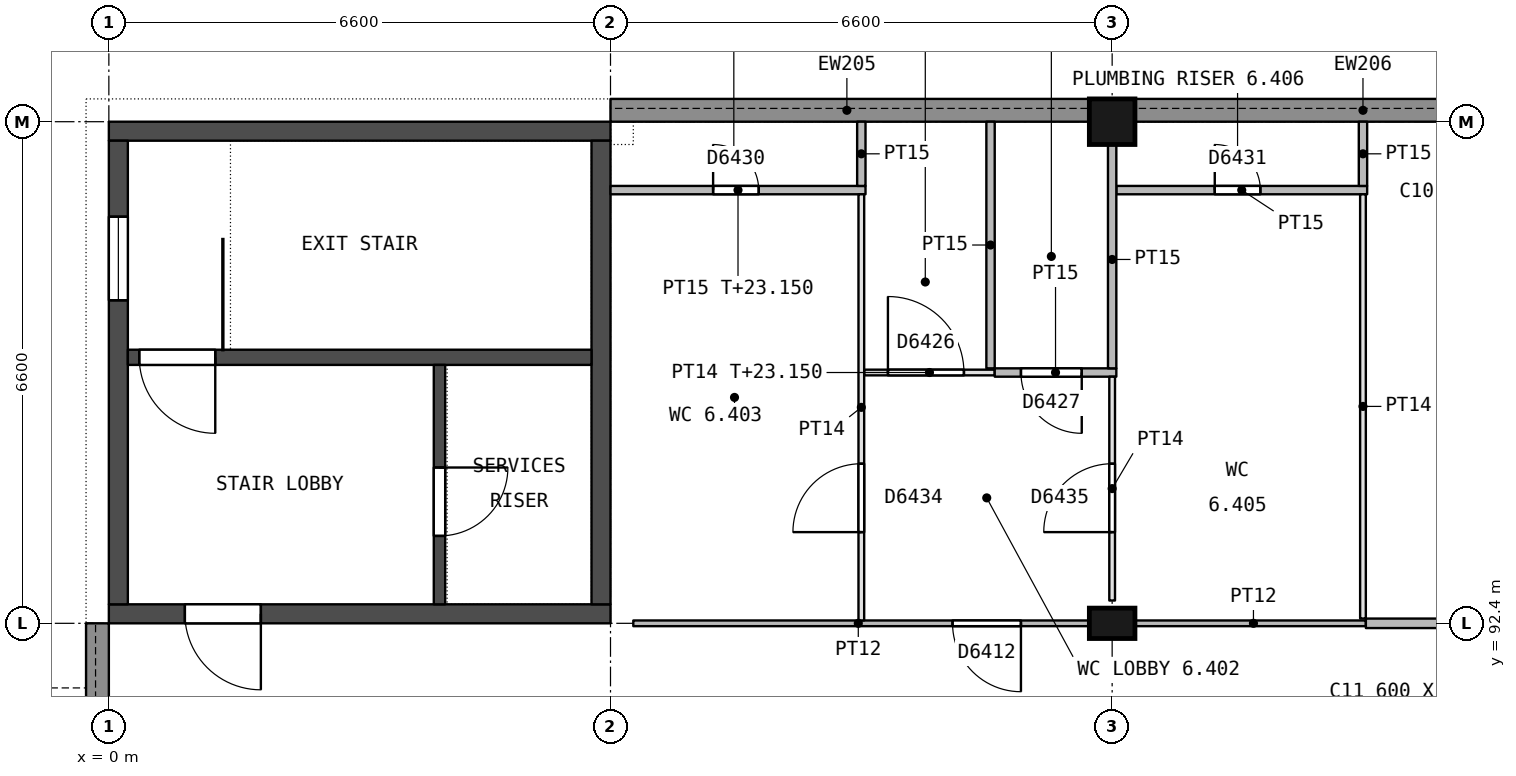
"""IFC4 building model, lengths in metres.
Left out: names, types, materials, properties, quantities, classifications, styles, units other than length and angle.
Written with IfcOpenShell. Run it as: python <this file> out.ifc"""

import sys

from ifc_helpers import new_model, si_unit, direction, frame, frame_2d, origin, origin_2d, place, context, subcontext, project, spatial, rectangle, extrude, element, fill, save


model = new_model("IFC4")
c1 = context("Model", 3, precision=1e-05, world=origin(), true_north=direction((0.0, 1.0)))
c2 = subcontext(c1, "Body", "Model", "MODEL_VIEW")
j1 = project(units=[si_unit("LENGTHUNIT", "METRE"), si_unit("PLANEANGLEUNIT", "RADIAN")], contexts=[c1])
p1 = place(None, origin())
s1 = spatial("IfcSite", under=j1, at=p1, CompositionType="ELEMENT")
p2 = place(p1, origin())
s2 = spatial("IfcBuilding", under=s1, at=p2, CompositionType="ELEMENT")
p3 = place(p2, frame((0.0, 0.0, 18.9)))
s3 = spatial("IfcBuildingStorey", under=s2, at=p3, CompositionType="ELEMENT", Elevation=18.9)
p4 = place(p3, frame((13.2, 92.4, 0.0), z_axis=(0.0, 0.0, 1.0), x_axis=(1.0, 0.0, 0.0)))
e1 = element("IfcColumn", 1, at=p4, inside=s3, PredefinedType="COLUMN", context=c2, shape_type="SweptSolid", body=[
    extrude(rectangle(XDim=0.6, YDim=0.4, at=origin_2d()), origin(), (0.0, 0.0, 1.0), 4.25),
])
p5 = place(p3, frame((13.2, 99.0, 0.0), z_axis=(0.0, 0.0, 1.0), x_axis=(1.0, 0.0, 0.0)))
e2 = element("IfcColumn", 2, at=p5, inside=s3, PredefinedType="COLUMN", context=c2, shape_type="SweptSolid", body=[
    extrude(rectangle(XDim=0.6, YDim=0.6, at=origin_2d()), origin(), (0.0, 0.0, 1.0), 4.25),
])
p6 = place(p3, frame((0.0, 92.525, 0.0), z_axis=(0.0, 0.0, 1.0), x_axis=(1.0, 0.0, 0.0)))
e3 = element("IfcWall", 3, at=p6, inside=s3, PredefinedType="SHEAR", context=c2, shape_type="SweptSolid", body=[
    extrude(rectangle(XDim=6.6, YDim=0.25, at=frame_2d((3.3, 0.0))), origin(), (0.0, 0.0, 1.0), 4.25),
])
p7 = place(p6, frame((1.0, 0.0, 0.0)))
e4 = element("IfcOpeningElement", 4, at=p7, cuts=e3, PredefinedType="OPENING", context=c2, shape_type="SweptSolid", body=[
    extrude(rectangle(XDim=1.0, YDim=2.1, at=frame_2d((0.5, 1.05))), frame((0.0, 0.135, 0.0), z_axis=(0.0, -1.0, 0.0), x_axis=(1.0, 0.0, 0.0)), (0.0, 0.0, 1.0), 0.27),
])
p8 = place(p3, frame((0.0, 98.875, 0.0), z_axis=(0.0, 0.0, 1.0), x_axis=(1.0, 0.0, 0.0)))
e5 = element("IfcWall", 5, at=p8, inside=s3, PredefinedType="SHEAR", context=c2, shape_type="SweptSolid", body=[
    extrude(rectangle(XDim=6.6, YDim=0.25, at=frame_2d((3.3, 0.0))), origin(), (0.0, 0.0, 1.0), 4.25),
])
p9 = place(p3, frame((0.125, 92.65, 0.0), z_axis=(0.0, 0.0, 1.0), x_axis=(0.0, 1.0, 0.0)))
e6 = element("IfcWall", 6, at=p9, inside=s3, PredefinedType="SHEAR", context=c2, shape_type="SweptSolid", body=[
    extrude(rectangle(XDim=6.1, YDim=0.25, at=frame_2d((3.05, 0.0))), origin(), (0.0, 0.0, 1.0), 4.25),
])
p10 = place(p9, frame((4.0, 0.0, 0.7)))
e7 = element("IfcOpeningElement", 7, at=p10, cuts=e6, PredefinedType="OPENING", context=c2, shape_type="SweptSolid", body=[
    extrude(rectangle(XDim=1.1, YDim=1.5, at=frame_2d((0.55, 0.75))), frame((0.0, 0.135, 0.0), z_axis=(0.0, -1.0, 0.0), x_axis=(1.0, 0.0, 0.0)), (0.0, 0.0, 1.0), 0.27),
])
p11 = place(p3, frame((6.475, 92.65, 0.0), z_axis=(0.0, 0.0, 1.0), x_axis=(0.0, 1.0, 0.0)))
e8 = element("IfcWall", 8, at=p11, inside=s3, PredefinedType="SHEAR", context=c2, shape_type="SweptSolid", body=[
    extrude(rectangle(XDim=6.1, YDim=0.25, at=frame_2d((3.05, 0.0))), origin(), (0.0, 0.0, 1.0), 4.25),
])
p12 = place(p3, frame((0.25, 95.9, 0.0), z_axis=(0.0, 0.0, 1.0), x_axis=(1.0, 0.0, 0.0)))
e9 = element("IfcWall", 9, at=p12, inside=s3, PredefinedType="SHEAR", context=c2, shape_type="SweptSolid", body=[
    extrude(rectangle(XDim=6.1, YDim=0.2, at=frame_2d((3.05, 0.0))), origin(), (0.0, 0.0, 1.0), 4.25),
])
p13 = place(p12, frame((0.15, 0.0, 0.0)))
e10 = element("IfcOpeningElement", 10, at=p13, cuts=e9, PredefinedType="OPENING", context=c2, shape_type="SweptSolid", body=[
    extrude(rectangle(XDim=1.0, YDim=2.1, at=frame_2d((0.5, 1.05))), frame((0.0, 0.11, 0.0), z_axis=(0.0, -1.0, 0.0), x_axis=(1.0, 0.0, 0.0)), (0.0, 0.0, 1.0), 0.22),
])
p14 = place(p3, frame((4.35, 92.65, 0.0), z_axis=(0.0, 0.0, 1.0), x_axis=(0.0, 1.0, 0.0)))
e11 = element("IfcWall", 11, at=p14, inside=s3, PredefinedType="SHEAR", context=c2, shape_type="SweptSolid", body=[
    extrude(rectangle(XDim=3.15, YDim=0.15, at=frame_2d((1.575, 0.0))), origin(), (0.0, 0.0, 1.0), 4.25),
])
p15 = place(p14, frame((0.9, 0.0, 0.0)))
e12 = element("IfcOpeningElement", 12, at=p15, cuts=e11, PredefinedType="OPENING", context=c2, shape_type="SweptSolid", body=[
    extrude(rectangle(XDim=0.9, YDim=2.1, at=frame_2d((0.45, 1.05))), frame((0.0, 0.085, 0.0), z_axis=(0.0, -1.0, 0.0), x_axis=(1.0, 0.0, 0.0)), (0.0, 0.0, 1.0), 0.17),
])
p16 = place(p3, frame((6.6, 99.15, 0.0), z_axis=(0.0, 0.0, 1.0), x_axis=(1.0, 0.0, 0.0)))
e13 = element("IfcWall", 13, at=p16, inside=s3, PredefinedType="STANDARD", context=c2, shape_type="SweptSolid", body=[
    extrude(rectangle(XDim=6.3, YDim=0.3, at=frame_2d((3.15, 0.0))), origin(), (0.0, 0.0, 1.0), 3.65),
])
p17 = place(p3, frame((13.5, 99.15, 0.0), z_axis=(0.0, 0.0, 1.0), x_axis=(1.0, 0.0, 0.0)))
e14 = element("IfcWall", 14, at=p17, inside=s3, PredefinedType="STANDARD", context=c2, shape_type="SweptSolid", body=[
    extrude(rectangle(XDim=6.0, YDim=0.3, at=frame_2d((3.0, 0.0))), origin(), (0.0, 0.0, 1.0), 3.65),
])
p18 = place(p3, frame((-0.15, 89.3, 0.0), z_axis=(0.0, 0.0, 1.0), x_axis=(0.0, 1.0, 0.0)))
e15 = element("IfcWall", 15, at=p18, inside=s3, PredefinedType="STANDARD", context=c2, shape_type="SweptSolid", body=[
    extrude(rectangle(XDim=3.1, YDim=0.3, at=frame_2d((1.55, 0.0))), origin(), (0.0, 0.0, 1.0), 3.65),
])
p19 = place(p18, frame((0.85, 0.0, 1.1)))
e16 = element("IfcOpeningElement", 16, at=p19, cuts=e15, PredefinedType="OPENING", context=c2, shape_type="SweptSolid", body=[
    extrude(rectangle(XDim=1.2, YDim=1.2, at=frame_2d((0.6, 0.6))), frame((0.0, 0.16, 0.0), z_axis=(0.0, -1.0, 0.0), x_axis=(1.0, 0.0, 0.0)), (0.0, 0.0, 1.0), 0.32),
])
p20 = place(p3, frame((6.9, 92.4, 0.0), z_axis=(0.0, 0.0, 1.0), x_axis=(1.0, 0.0, 0.0)))
e17 = element("IfcWall", 17, at=p20, inside=s3, PredefinedType="PARTITIONING", context=c2, shape_type="SweptSolid", body=[
    extrude(rectangle(XDim=6.0, YDim=0.075, at=frame_2d((3.0, 0.0))), origin(), (0.0, 0.0, 1.0), 3.65),
])
p21 = place(p20, frame((4.2, 0.0, 0.0)))
e18 = element("IfcOpeningElement", 18, at=p21, cuts=e17, PredefinedType="OPENING", context=c2, shape_type="SweptSolid", body=[
    extrude(rectangle(XDim=0.9, YDim=2.1, at=frame_2d((0.45, 1.05))), frame((0.0, 0.047, 0.0), z_axis=(0.0, -1.0, 0.0), x_axis=(1.0, 0.0, 0.0)), (0.0, 0.0, 1.0), 0.095),
])
p22 = place(p3, frame((13.5, 92.4, 0.0), z_axis=(0.0, 0.0, 1.0), x_axis=(1.0, 0.0, 0.0)))
e19 = element("IfcWall", 19, at=p22, inside=s3, PredefinedType="PARTITIONING", context=c2, shape_type="SweptSolid", body=[
    extrude(rectangle(XDim=3.038, YDim=0.075, at=frame_2d((1.519, 0.0))), origin(), (0.0, 0.0, 1.0), 3.65),
])
p23 = place(p3, frame((16.538, 92.4, 0.0), z_axis=(0.0, 0.0, 1.0), x_axis=(1.0, 0.0, 0.0)))
e20 = element("IfcWall", 20, at=p23, inside=s3, PredefinedType="PARTITIONING", context=c2, shape_type="SweptSolid", body=[
    extrude(rectangle(XDim=2.962, YDim=0.125, at=frame_2d((1.481, 0.0))), origin(), (0.0, 0.0, 1.0), 3.65),
])
p24 = place(p23, frame((1.862, 0.0, 0.0)))
e21 = element("IfcOpeningElement", 21, at=p24, cuts=e20, PredefinedType="OPENING", context=c2, shape_type="SweptSolid", body=[
    extrude(rectangle(XDim=1.0, YDim=2.1, at=frame_2d((0.5, 1.05))), frame((0.0, 0.073, 0.0), z_axis=(0.0, -1.0, 0.0), x_axis=(1.0, 0.0, 0.0)), (0.0, 0.0, 1.0), 0.145),
])
p25 = place(p3, frame((11.655, 95.7, 0.0), z_axis=(0.0, 0.0, 1.0), x_axis=(-1.0, 0.0, 0.0)))
e22 = element("IfcWall", 22, at=p25, inside=s3, PredefinedType="PARTITIONING", context=c2, shape_type="SweptSolid", body=[
    extrude(rectangle(XDim=1.717, YDim=0.075, at=frame_2d((0.858, 0.0))), origin(), (0.0, 0.0, 1.0), 4.25),
])
p26 = place(p25, frame((0.405, 0.0, 0.0)))
e23 = element("IfcOpeningElement", 23, at=p26, cuts=e22, PredefinedType="OPENING", context=c2, shape_type="SweptSolid", body=[
    extrude(rectangle(XDim=1.0, YDim=2.1, at=frame_2d((0.5, 1.05))), frame((0.0, 0.047, 0.0), z_axis=(0.0, -1.0, 0.0), x_axis=(1.0, 0.0, 0.0)), (0.0, 0.0, 1.0), 0.095),
])
p27 = place(p3, frame((11.655, 95.7, 0.0), z_axis=(0.0, 0.0, 1.0), x_axis=(1.0, 0.0, 0.0)))
e24 = element("IfcWall", 24, at=p27, inside=s3, PredefinedType="PARTITIONING", context=c2, shape_type="SweptSolid", body=[
    extrude(rectangle(XDim=1.6, YDim=0.11, at=frame_2d((0.8, 0.0))), origin(), (0.0, 0.0, 1.0), 3.65),
])
p28 = place(p27, frame((0.345, 0.0, 0.0)))
e25 = element("IfcOpeningElement", 25, at=p28, cuts=e24, PredefinedType="OPENING", context=c2, shape_type="SweptSolid", body=[
    extrude(rectangle(XDim=0.8, YDim=2.1, at=frame_2d((0.4, 1.05))), frame((0.0, 0.065, 0.0), z_axis=(0.0, -1.0, 0.0), x_axis=(1.0, 0.0, 0.0)), (0.0, 0.0, 1.0), 0.13),
])
p29 = place(p3, frame((9.955, 98.1, 0.0), z_axis=(0.0, 0.0, 1.0), x_axis=(-1.0, 0.0, 0.0)))
e26 = element("IfcWall", 26, at=p29, inside=s3, PredefinedType="PARTITIONING", context=c2, shape_type="SweptSolid", body=[
    extrude(rectangle(XDim=3.355, YDim=0.11, at=frame_2d((1.677, 0.0))), origin(), (0.0, 0.0, 1.0), 4.25),
])
p30 = place(p29, frame((1.405, 0.0, 0.0)))
e27 = element("IfcOpeningElement", 27, at=p30, cuts=e26, PredefinedType="OPENING", context=c2, shape_type="SweptSolid", body=[
    extrude(rectangle(XDim=0.6, YDim=2.1, at=frame_2d((0.3, 1.05))), frame((0.0, 0.065, 0.0), z_axis=(0.0, -1.0, 0.0), x_axis=(1.0, 0.0, 0.0)), (0.0, 0.0, 1.0), 0.13),
])
p31 = place(p3, frame((16.555, 98.1, 0.0), z_axis=(0.0, 0.0, 1.0), x_axis=(-1.0, 0.0, 0.0)))
e28 = element("IfcWall", 28, at=p31, inside=s3, PredefinedType="PARTITIONING", context=c2, shape_type="SweptSolid", body=[
    extrude(rectangle(XDim=3.3, YDim=0.11, at=frame_2d((1.65, 0.0))), origin(), (0.0, 0.0, 1.0), 3.65),
])
p32 = place(p31, frame((1.405, 0.0, 0.0)))
e29 = element("IfcOpeningElement", 29, at=p32, cuts=e28, PredefinedType="OPENING", context=c2, shape_type="SweptSolid", body=[
    extrude(rectangle(XDim=0.6, YDim=2.1, at=frame_2d((0.3, 1.05))), frame((0.0, 0.065, 0.0), z_axis=(0.0, -1.0, 0.0), x_axis=(1.0, 0.0, 0.0)), (0.0, 0.0, 1.0), 0.13),
])
p33 = place(p3, frame((9.9, 92.438, 0.0), z_axis=(0.0, 0.0, 1.0), x_axis=(0.0, 1.0, 0.0)))
e30 = element("IfcWall", 30, at=p33, inside=s3, PredefinedType="PARTITIONING", context=c2, shape_type="SweptSolid", body=[
    extrude(rectangle(XDim=5.607, YDim=0.075, at=frame_2d((2.803, 0.0))), origin(), (0.0, 0.0, 1.0), 3.65),
])
p34 = place(p33, frame((1.162, 0.0, 0.0)))
e31 = element("IfcOpeningElement", 31, at=p34, cuts=e30, PredefinedType="OPENING", context=c2, shape_type="SweptSolid", body=[
    extrude(rectangle(XDim=0.9, YDim=2.1, at=frame_2d((0.45, 1.05))), frame((0.0, 0.047, 0.0), z_axis=(0.0, -1.0, 0.0), x_axis=(1.0, 0.0, 0.0)), (0.0, 0.0, 1.0), 0.095),
])
p35 = place(p3, frame((9.9, 98.155, 0.0), z_axis=(0.0, 0.0, 1.0), x_axis=(0.0, 1.0, 0.0)))
e32 = element("IfcWall", 32, at=p35, inside=s3, PredefinedType="PARTITIONING", context=c2, shape_type="SweptSolid", body=[
    extrude(rectangle(XDim=0.845, YDim=0.11, at=frame_2d((0.422, 0.0))), origin(), (0.0, 0.0, 1.0), 3.65),
])
p36 = place(p3, frame((11.6, 95.755, 0.0), z_axis=(0.0, 0.0, 1.0), x_axis=(0.0, 1.0, 0.0)))
e33 = element("IfcWall", 33, at=p36, inside=s3, PredefinedType="PARTITIONING", context=c2, shape_type="SweptSolid", body=[
    extrude(rectangle(XDim=3.245, YDim=0.11, at=frame_2d((1.623, 0.0))), origin(), (0.0, 0.0, 1.0), 3.65),
])
p37 = place(p3, frame((13.2, 95.645, 0.0), z_axis=(0.0, 0.0, 1.0), x_axis=(0.0, -1.0, 0.0)))
e34 = element("IfcWall", 34, at=p37, inside=s3, PredefinedType="PARTITIONING", context=c2, shape_type="SweptSolid", body=[
    extrude(rectangle(XDim=2.945, YDim=0.075, at=frame_2d((1.473, 0.0))), origin(), (0.0, 0.0, 1.0), 3.65),
])
p38 = place(p37, frame((1.145, 0.0, 0.0)))
e35 = element("IfcOpeningElement", 35, at=p38, cuts=e34, PredefinedType="OPENING", context=c2, shape_type="SweptSolid", body=[
    extrude(rectangle(XDim=0.9, YDim=2.1, at=frame_2d((0.45, 1.05))), frame((0.0, 0.047, 0.0), z_axis=(0.0, -1.0, 0.0), x_axis=(1.0, 0.0, 0.0)), (0.0, 0.0, 1.0), 0.095),
])
p39 = place(p3, frame((13.2, 95.755, 0.0), z_axis=(0.0, 0.0, 1.0), x_axis=(0.0, 1.0, 0.0)))
e36 = element("IfcWall", 36, at=p39, inside=s3, PredefinedType="PARTITIONING", context=c2, shape_type="SweptSolid", body=[
    extrude(rectangle(XDim=2.945, YDim=0.11, at=frame_2d((1.473, 0.0))), origin(), (0.0, 0.0, 1.0), 3.65),
])
p40 = place(p3, frame((16.5, 92.463, 0.0), z_axis=(0.0, 0.0, 1.0), x_axis=(0.0, 1.0, 0.0)))
e37 = element("IfcWall", 37, at=p40, inside=s3, PredefinedType="PARTITIONING", context=c2, shape_type="SweptSolid", body=[
    extrude(rectangle(XDim=5.582, YDim=0.075, at=frame_2d((2.791, 0.0))), origin(), (0.0, 0.0, 1.0), 3.65),
])
p41 = place(p3, frame((16.5, 98.155, 0.0), z_axis=(0.0, 0.0, 1.0), x_axis=(0.0, 1.0, 0.0)))
e38 = element("IfcWall", 38, at=p41, inside=s3, PredefinedType="PARTITIONING", context=c2, shape_type="SweptSolid", body=[
    extrude(rectangle(XDim=0.845, YDim=0.11, at=frame_2d((0.422, 0.0))), origin(), (0.0, 0.0, 1.0), 3.65),
])
p42 = place(p15, origin())
e39 = element("IfcDoor", 39, at=p42, inside=s3, OperationType="SINGLE_SWING_RIGHT", PredefinedType="DOOR", context=c2, shape_type="SweptSolid", body=[
    extrude(rectangle(XDim=0.9, YDim=2.1, at=frame_2d((0.45, 1.05))), frame((0.0, 0.025, 0.0), z_axis=(0.0, -1.0, 0.0), x_axis=(1.0, 0.0, 0.0)), (0.0, 0.0, 1.0), 0.05),
])
fill(e12, e39)
p43 = place(p7, origin())
e40 = element("IfcDoor", 40, at=p43, inside=s3, OperationType="SINGLE_SWING_RIGHT", PredefinedType="DOOR", context=c2, shape_type="SweptSolid", body=[
    extrude(rectangle(XDim=1.0, YDim=2.1, at=frame_2d((0.5, 1.05))), frame((0.0, 0.025, 0.0), z_axis=(0.0, -1.0, 0.0), x_axis=(1.0, 0.0, 0.0)), (0.0, 0.0, 1.0), 0.05),
])
fill(e4, e40)
p44 = place(p13, origin())
e41 = element("IfcDoor", 41, at=p44, inside=s3, OperationType="SINGLE_SWING_RIGHT", PredefinedType="DOOR", context=c2, shape_type="SweptSolid", body=[
    extrude(rectangle(XDim=1.0, YDim=2.1, at=frame_2d((0.5, 1.05))), frame((0.0, 0.025, 0.0), z_axis=(0.0, -1.0, 0.0), x_axis=(1.0, 0.0, 0.0)), (0.0, 0.0, 1.0), 0.05),
])
fill(e10, e41)
p45 = place(p10, origin())
e42 = element("IfcWindow", 42, at=p45, inside=s3, PartitioningType="SINGLE_PANEL", PredefinedType="WINDOW", context=c2, shape_type="SweptSolid", body=[
    extrude(rectangle(XDim=1.1, YDim=1.5, at=frame_2d((0.55, 0.75))), frame((0.0, 0.03, 0.0), z_axis=(0.0, -1.0, 0.0), x_axis=(1.0, 0.0, 0.0)), (0.0, 0.0, 1.0), 0.06),
])
fill(e7, e42)
p46 = place(p21, origin())
e43 = element("IfcDoor", 43, at=p46, inside=s3, OperationType="SINGLE_SWING_RIGHT", PredefinedType="DOOR", context=c2, shape_type="SweptSolid", body=[
    extrude(rectangle(XDim=0.9, YDim=2.1, at=frame_2d((0.45, 1.05))), frame((0.0, 0.025, 0.0), z_axis=(0.0, -1.0, 0.0), x_axis=(1.0, 0.0, 0.0)), (0.0, 0.0, 1.0), 0.05),
])
fill(e18, e43)
p47 = place(p26, origin())
e44 = element("IfcDoor", 44, at=p47, inside=s3, OperationType="SINGLE_SWING_RIGHT", PredefinedType="DOOR", context=c2, shape_type="SweptSolid", body=[
    extrude(rectangle(XDim=1.0, YDim=2.1, at=frame_2d((0.5, 1.05))), frame((0.0, 0.025, 0.0), z_axis=(0.0, -1.0, 0.0), x_axis=(1.0, 0.0, 0.0)), (0.0, 0.0, 1.0), 0.05),
])
fill(e23, e44)
p48 = place(p28, origin())
e45 = element("IfcDoor", 45, at=p48, inside=s3, OperationType="SINGLE_SWING_RIGHT", PredefinedType="DOOR", context=c2, shape_type="SweptSolid", body=[
    extrude(rectangle(XDim=0.8, YDim=2.1, at=frame_2d((0.4, 1.05))), frame((0.0, 0.025, 0.0), z_axis=(0.0, -1.0, 0.0), x_axis=(1.0, 0.0, 0.0)), (0.0, 0.0, 1.0), 0.05),
])
fill(e25, e45)
p49 = place(p30, origin())
e46 = element("IfcDoor", 46, at=p49, inside=s3, OperationType="SINGLE_SWING_RIGHT", PredefinedType="DOOR", context=c2, shape_type="SweptSolid", body=[
    extrude(rectangle(XDim=0.6, YDim=2.1, at=frame_2d((0.3, 1.05))), frame((0.0, 0.025, 0.0), z_axis=(0.0, -1.0, 0.0), x_axis=(1.0, 0.0, 0.0)), (0.0, 0.0, 1.0), 0.05),
])
fill(e27, e46)
p50 = place(p32, origin())
e47 = element("IfcDoor", 47, at=p50, inside=s3, OperationType="SINGLE_SWING_RIGHT", PredefinedType="DOOR", context=c2, shape_type="SweptSolid", body=[
    extrude(rectangle(XDim=0.6, YDim=2.1, at=frame_2d((0.3, 1.05))), frame((0.0, 0.025, 0.0), z_axis=(0.0, -1.0, 0.0), x_axis=(1.0, 0.0, 0.0)), (0.0, 0.0, 1.0), 0.05),
])
fill(e29, e47)
p51 = place(p34, origin())
e48 = element("IfcDoor", 48, at=p51, inside=s3, OperationType="SINGLE_SWING_LEFT", PredefinedType="DOOR", context=c2, shape_type="SweptSolid", body=[
    extrude(rectangle(XDim=0.9, YDim=2.1, at=frame_2d((0.45, 1.05))), frame((0.0, 0.025, 0.0), z_axis=(0.0, -1.0, 0.0), x_axis=(1.0, 0.0, 0.0)), (0.0, 0.0, 1.0), 0.05),
])
fill(e31, e48)
p52 = place(p38, origin())
e49 = element("IfcDoor", 49, at=p52, inside=s3, OperationType="SINGLE_SWING_RIGHT", PredefinedType="DOOR", context=c2, shape_type="SweptSolid", body=[
    extrude(rectangle(XDim=0.9, YDim=2.1, at=frame_2d((0.45, 1.05))), frame((0.0, 0.025, 0.0), z_axis=(0.0, -1.0, 0.0), x_axis=(1.0, 0.0, 0.0)), (0.0, 0.0, 1.0), 0.05),
])
fill(e35, e49)
save(model, sys.argv[1])
